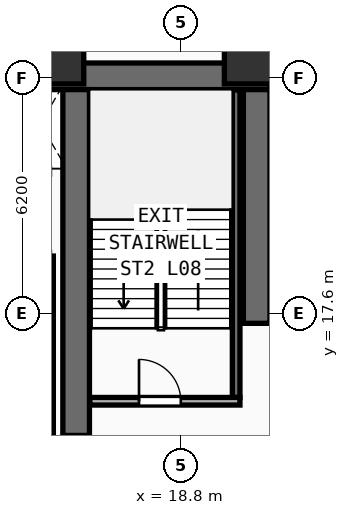
"""IFC4 building model, lengths in metres.
Left out: names, types, materials, properties, quantities, classifications, styles, units other than length and angle.
Written with IfcOpenShell. Run it as: python <this file> out.ifc"""

import sys

from ifc_helpers import new_model, si_unit, direction, frame, frame_2d, origin, origin_2d, place, context, subcontext, project, spatial, rectangle, extrude, element, fill, save


model = new_model("IFC4")
c1 = context("Model", 3, precision=1e-05, world=origin(), true_north=direction((0.0, 1.0)))
c2 = subcontext(c1, "Body", "Model", "MODEL_VIEW")
j1 = project(units=[si_unit("LENGTHUNIT", "METRE"), si_unit("PLANEANGLEUNIT", "RADIAN")], contexts=[c1])
p1 = place(None, origin())
s1 = spatial("IfcSite", under=j1, at=p1, CompositionType="ELEMENT")
p2 = place(p1, origin())
s2 = spatial("IfcBuilding", under=s1, at=p2, CompositionType="ELEMENT")
p3 = place(p2, frame((0.0, 0.0, 33.4)))
s3 = spatial("IfcBuildingStorey", under=s2, at=p3, CompositionType="ELEMENT", Elevation=33.4)
p4 = place(p3, frame((7.1, 23.85, 0.0), z_axis=(0.0, 0.0, 1.0), x_axis=(1.0, 0.0, 0.0)))
e1 = element("IfcWall", 1, at=p4, inside=s3, PredefinedType="SHEAR", context=c2, shape_type="SweptSolid", body=[
    extrude(rectangle(XDim=14.05, YDim=0.7, at=frame_2d((7.025, 0.0))), origin(), (0.0, 0.0, 1.0), 3.54),
])
p5 = place(p3, frame((20.8, 17.35, 0.0), z_axis=(0.0, 0.0, 1.0), x_axis=(0.0, 1.0, 0.0)))
e2 = element("IfcWall", 2, at=p5, inside=s3, PredefinedType="SHEAR", context=c2, shape_type="SweptSolid", body=[
    extrude(rectangle(XDim=6.15, YDim=0.7, at=frame_2d((3.075, 0.0))), origin(), (0.0, 0.0, 1.0), 3.54),
])
p6 = place(p3, frame((16.05, 14.4, 0.0), z_axis=(0.0, 0.0, 1.0), x_axis=(0.0, 1.0, 0.0)))
e3 = element("IfcWall", 3, at=p6, inside=s3, PredefinedType="SHEAR", context=c2, shape_type="SweptSolid", body=[
    extrude(rectangle(XDim=9.1, YDim=0.7, at=frame_2d((4.55, 0.0))), origin(), (0.0, 0.0, 1.0), 3.54),
])
for number, where, z_axis, x_axis in (
    (4, (15.45, 24.45, 0.0), (0.0, 0.0, 1.0), (1.0, 0.0, 0.0)),
    (5, (20.75, 24.45, 0.0), (0.0, 0.0, 1.0), (1.0, 0.0, 0.0)),
):
    element("IfcColumn", number, at=place(p3, frame(where, z_axis=z_axis, x_axis=x_axis)), inside=s3, PredefinedType="COLUMN", context=c2, shape_type="SweptSolid", body=[
        extrude(rectangle(XDim=1.6, YDim=1.6, at=origin_2d()), origin(), (0.0, 0.0, 1.0), 3.54),
    ])
p7 = place(p3, frame((20.26, 15.4, 0.0), z_axis=(0.0, 0.0, 1.0), x_axis=(0.0, 1.0, 0.0)))
e6 = element("IfcWall", 6, at=p7, inside=s3, PredefinedType="SHEAR", context=c2, shape_type="SweptSolid", body=[
    extrude(rectangle(XDim=8.09, YDim=0.2, at=frame_2d((4.045, 0.0))), origin(), (0.0, 0.0, 1.0), 3.54),
])
p8 = place(p3, frame((16.41, 15.3, 0.0), z_axis=(0.0, 0.0, 1.0), x_axis=(1.0, 0.0, 0.0)))
e7 = element("IfcWall", 7, at=p8, inside=s3, PredefinedType="PARTITIONING", context=c2, shape_type="SweptSolid", body=[
    extrude(rectangle(XDim=3.95, YDim=0.2, at=frame_2d((1.975, 0.0))), origin(), (0.0, 0.0, 1.0), 3.54),
])
p9 = place(p8, frame((1.294, 0.0, 0.0)))
e8 = element("IfcOpeningElement", 8, at=p9, cuts=e7, PredefinedType="OPENING", context=c2, shape_type="SweptSolid", body=[
    extrude(rectangle(XDim=1.1, YDim=2.2, at=frame_2d((0.55, 1.1))), frame((0.0, 0.11, 0.0), z_axis=(0.0, -1.0, 0.0), x_axis=(1.0, 0.0, 0.0)), (0.0, 0.0, 1.0), 0.22),
])
p10 = place(p3, frame((15.35, 14.22, 0.0), z_axis=(0.0, 0.0, 1.0), x_axis=(0.0, 1.0, 0.0)))
e9 = element("IfcWall", 9, at=p10, inside=s3, PredefinedType="PARTITIONING", context=c2, shape_type="SweptSolid", body=[
    extrude(rectangle(XDim=2.23, YDim=0.2, at=frame_2d((1.115, 0.0))), origin(), (0.0, 0.0, 1.0), 3.54),
])
p11 = place(p3, frame((15.35, 16.45, 0.0), z_axis=(0.0, 0.0, 1.0), x_axis=(0.0, 1.0, 0.0)))
e10 = element("IfcWall", 10, at=p11, inside=s3, PredefinedType="PARTITIONING", context=c2, shape_type="SweptSolid", body=[
    extrude(rectangle(XDim=2.67, YDim=0.2, at=frame_2d((1.335, 0.0))), origin(), (0.0, 0.0, 1.0), 3.54),
])
p12 = place(p9, origin())
e11 = element("IfcDoor", 11, at=p12, inside=s3, OperationType="SINGLE_SWING_LEFT", PredefinedType="DOOR", context=c2, shape_type="SweptSolid", body=[
    extrude(rectangle(XDim=1.1, YDim=2.2, at=frame_2d((0.55, 1.1))), frame((0.0, 0.025, 0.0), z_axis=(0.0, -1.0, 0.0), x_axis=(1.0, 0.0, 0.0)), (0.0, 0.0, 1.0), 0.05),
])
fill(e8, e11)
save(model, sys.argv[1])
